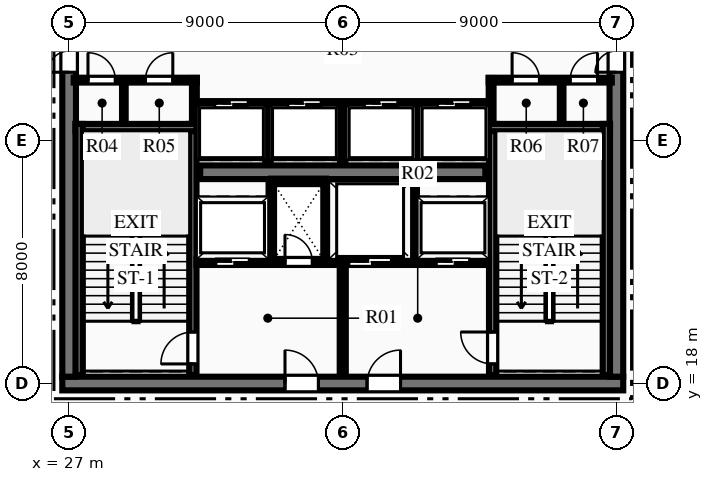
"""IFC4 building model, lengths in metres.
Left out: names, types, materials, properties, quantities, classifications, styles, units other than length and angle.
Written with IfcOpenShell. Run it as: python <this file> out.ifc"""

import sys

from ifc_helpers import new_model, si_unit, direction, frame, frame_2d, origin, place, context, subcontext, project, spatial, rectangle, extrude, element, fill, save


model = new_model("IFC4")
c1 = context("Model", 3, precision=1e-05, world=origin(), true_north=direction((0.0, 1.0)))
c2 = subcontext(c1, "Body", "Model", "MODEL_VIEW")
j1 = project(units=[si_unit("LENGTHUNIT", "METRE"), si_unit("PLANEANGLEUNIT", "RADIAN")], contexts=[c1])
p1 = place(None, origin())
s1 = spatial("IfcSite", under=j1, at=p1, CompositionType="ELEMENT")
p2 = place(p1, origin())
s2 = spatial("IfcBuilding", under=s1, at=p2, CompositionType="ELEMENT")
p3 = place(p2, frame((0.0, 0.0, 274.95)))
s3 = spatial("IfcBuildingStorey", under=s2, at=p3, CompositionType="ELEMENT", Elevation=274.95)
p4 = place(p3, frame((26.775, 18.0, 0.0), z_axis=(0.0, 0.0, 1.0), x_axis=(1.0, 0.0, 0.0)))
e1 = element("IfcWall", 1, at=p4, inside=s3, PredefinedType="SHEAR", context=c2, shape_type="SweptSolid", body=[
    extrude(rectangle(XDim=18.45, YDim=0.45, at=frame_2d((9.225, 0.0))), origin(), (0.0, 0.0, 1.0), 3.75),
])
p5 = place(p4, frame((7.325, 0.0, 0.0)))
e2 = element("IfcOpeningElement", 2, at=p5, cuts=e1, PredefinedType="OPENING", context=c2, shape_type="SweptSolid", body=[
    extrude(rectangle(XDim=1.1, YDim=2.15, at=frame_2d((0.55, 1.075))), frame((0.0, 0.235, 0.0), z_axis=(0.0, -1.0, 0.0), x_axis=(1.0, 0.0, 0.0)), (0.0, 0.0, 1.0), 0.47),
])
p6 = place(p4, frame((10.025, 0.0, 0.0)))
e3 = element("IfcOpeningElement", 3, at=p6, cuts=e1, PredefinedType="OPENING", context=c2, shape_type="SweptSolid", body=[
    extrude(rectangle(XDim=1.1, YDim=2.15, at=frame_2d((0.55, 1.075))), frame((0.0, 0.235, 0.0), z_axis=(0.0, -1.0, 0.0), x_axis=(1.0, 0.0, 0.0)), (0.0, 0.0, 1.0), 0.47),
])
p7 = place(p3, frame((27.0, 18.225, 0.0), z_axis=(0.0, 0.0, 1.0), x_axis=(0.0, 1.0, 0.0)))
e4 = element("IfcWall", 4, at=p7, inside=s3, PredefinedType="SHEAR", context=c2, shape_type="SweptSolid", body=[
    extrude(rectangle(XDim=15.55, YDim=0.45, at=frame_2d((7.775, 0.0))), origin(), (0.0, 0.0, 1.0), 3.75),
])
p8 = place(p7, frame((10.015, 0.0, 0.0)))
e5 = element("IfcOpeningElement", 5, at=p8, cuts=e4, PredefinedType="OPENING", context=c2, shape_type="SweptSolid", body=[
    extrude(rectangle(XDim=1.4, YDim=2.2, at=frame_2d((0.7, 1.1))), frame((0.0, 0.235, 0.0), z_axis=(0.0, -1.0, 0.0), x_axis=(1.0, 0.0, 0.0)), (0.0, 0.0, 1.0), 0.47),
])
p9 = place(p3, frame((45.0, 18.225, 0.0), z_axis=(0.0, 0.0, 1.0), x_axis=(0.0, 1.0, 0.0)))
e6 = element("IfcWall", 6, at=p9, inside=s3, PredefinedType="SHEAR", context=c2, shape_type="SweptSolid", body=[
    extrude(rectangle(XDim=15.55, YDim=0.45, at=frame_2d((7.775, 0.0))), origin(), (0.0, 0.0, 1.0), 3.75),
])
p10 = place(p9, frame((10.015, 0.0, 0.0)))
e7 = element("IfcOpeningElement", 7, at=p10, cuts=e6, PredefinedType="OPENING", context=c2, shape_type="SweptSolid", body=[
    extrude(rectangle(XDim=1.4, YDim=2.2, at=frame_2d((0.7, 1.1))), frame((0.0, 0.235, 0.0), z_axis=(0.0, -1.0, 0.0), x_axis=(1.0, 0.0, 0.0)), (0.0, 0.0, 1.0), 0.47),
])
p11 = place(p3, frame((31.31, 24.95, 0.0), z_axis=(0.0, 0.0, 1.0), x_axis=(1.0, 0.0, 0.0)))
e8 = element("IfcWall", 8, at=p11, inside=s3, PredefinedType="SHEAR", context=c2, shape_type="SweptSolid", body=[
    extrude(rectangle(XDim=9.38, YDim=0.45, at=frame_2d((4.69, 0.0))), origin(), (0.0, 0.0, 1.0), 3.75),
])
p12 = place(p3, frame((31.07, 18.28, 0.0), z_axis=(0.0, 0.0, 1.0), x_axis=(0.0, 1.0, 0.0)))
e9 = element("IfcWall", 9, at=p12, inside=s3, PredefinedType="SHEAR", context=c2, shape_type="SweptSolid", body=[
    extrude(rectangle(XDim=8.26, YDim=0.24, at=frame_2d((4.13, 0.0))), origin(), (0.0, 0.0, 1.0), 3.75),
])
p13 = place(p12, frame((0.365, 0.0, 0.0)))
e10 = element("IfcOpeningElement", 10, at=p13, cuts=e9, PredefinedType="OPENING", context=c2, shape_type="SweptSolid", body=[
    extrude(rectangle(XDim=1.05, YDim=2.15, at=frame_2d((0.525, 1.075))), frame((0.0, 0.13, 0.0), z_axis=(0.0, -1.0, 0.0), x_axis=(1.0, 0.0, 0.0)), (0.0, 0.0, 1.0), 0.26),
])
p14 = place(p3, frame((27.21, 26.42, 0.0), z_axis=(0.0, 0.0, 1.0), x_axis=(1.0, 0.0, 0.0)))
e11 = element("IfcWall", 11, at=p14, inside=s3, PredefinedType="SHEAR", context=c2, shape_type="SweptSolid", body=[
    extrude(rectangle(XDim=3.98, YDim=0.24, at=frame_2d((1.99, 0.0))), origin(), (0.0, 0.0, 1.0), 3.75),
])
p15 = place(p3, frame((27.33, 18.28, 0.0), z_axis=(0.0, 0.0, 1.0), x_axis=(0.0, 1.0, 0.0)))
e12 = element("IfcWall", 12, at=p15, inside=s3, PredefinedType="SHEAR", context=c2, shape_type="SweptSolid", body=[
    extrude(rectangle(XDim=8.26, YDim=0.24, at=frame_2d((4.13, 0.0))), origin(), (0.0, 0.0, 1.0), 3.75),
])
p16 = place(p3, frame((40.93, 18.28, 0.0), z_axis=(0.0, 0.0, 1.0), x_axis=(0.0, 1.0, 0.0)))
e13 = element("IfcWall", 13, at=p16, inside=s3, PredefinedType="SHEAR", context=c2, shape_type="SweptSolid", body=[
    extrude(rectangle(XDim=8.26, YDim=0.24, at=frame_2d((4.13, 0.0))), origin(), (0.0, 0.0, 1.0), 3.75),
])
p17 = place(p16, frame((0.365, 0.0, 0.0)))
e14 = element("IfcOpeningElement", 14, at=p17, cuts=e13, PredefinedType="OPENING", context=c2, shape_type="SweptSolid", body=[
    extrude(rectangle(XDim=1.05, YDim=2.15, at=frame_2d((0.525, 1.075))), frame((0.0, 0.13, 0.0), z_axis=(0.0, -1.0, 0.0), x_axis=(1.0, 0.0, 0.0)), (0.0, 0.0, 1.0), 0.26),
])
p18 = place(p3, frame((40.81, 26.42, 0.0), z_axis=(0.0, 0.0, 1.0), x_axis=(1.0, 0.0, 0.0)))
e15 = element("IfcWall", 15, at=p18, inside=s3, PredefinedType="SHEAR", context=c2, shape_type="SweptSolid", body=[
    extrude(rectangle(XDim=3.98, YDim=0.24, at=frame_2d((1.99, 0.0))), origin(), (0.0, 0.0, 1.0), 3.75),
])
p19 = place(p3, frame((44.67, 18.28, 0.0), z_axis=(0.0, 0.0, 1.0), x_axis=(0.0, 1.0, 0.0)))
e16 = element("IfcWall", 16, at=p19, inside=s3, PredefinedType="SHEAR", context=c2, shape_type="SweptSolid", body=[
    extrude(rectangle(XDim=8.26, YDim=0.24, at=frame_2d((4.13, 0.0))), origin(), (0.0, 0.0, 1.0), 3.75),
])
p20 = place(p3, frame((36.0, 18.28, 0.0), z_axis=(0.0, 0.0, 1.0), x_axis=(0.0, 1.0, 0.0)))
e17 = element("IfcWall", 17, at=p20, inside=s3, PredefinedType="PARTITIONING", context=c2, shape_type="SweptSolid", body=[
    extrude(rectangle(XDim=3.77, YDim=0.2, at=frame_2d((1.885, 0.0))), origin(), (0.0, 0.0, 1.0), 3.48),
])
p21 = place(p3, frame((31.19, 22.0, 0.0), z_axis=(0.0, 0.0, 1.0), x_axis=(1.0, 0.0, 0.0)))
e18 = element("IfcWall", 18, at=p21, inside=s3, PredefinedType="PARTITIONING", context=c2, shape_type="SweptSolid", body=[
    extrude(rectangle(XDim=4.69, YDim=0.2, at=frame_2d((2.345, 0.0))), origin(), (0.0, 0.0, 1.0), 3.48),
])
p22 = place(p21, frame((2.91, 0.0, 0.0)))
e19 = element("IfcOpeningElement", 19, at=p22, cuts=e18, PredefinedType="OPENING", context=c2, shape_type="SweptSolid", body=[
    extrude(rectangle(XDim=0.9, YDim=2.15, at=frame_2d((0.45, 1.075))), frame((0.0, 0.11, 0.0), z_axis=(0.0, -1.0, 0.0), x_axis=(1.0, 0.0, 0.0)), (0.0, 0.0, 1.0), 0.22),
])
p23 = place(p21, frame((0.635, 0.0, 0.0)))
e20 = element("IfcOpeningElement", 20, at=p23, cuts=e18, PredefinedType="OPENING", context=c2, shape_type="SweptSolid", body=[
    extrude(rectangle(XDim=1.1, YDim=2.15, at=frame_2d((0.55, 1.075))), frame((0.0, 0.11, 0.0), z_axis=(0.0, -1.0, 0.0), x_axis=(1.0, 0.0, 0.0)), (0.0, 0.0, 1.0), 0.22),
])
p24 = place(p3, frame((36.12, 22.0, 0.0), z_axis=(0.0, 0.0, 1.0), x_axis=(1.0, 0.0, 0.0)))
e21 = element("IfcWall", 21, at=p24, inside=s3, PredefinedType="PARTITIONING", context=c2, shape_type="SweptSolid", body=[
    extrude(rectangle(XDim=4.69, YDim=0.2, at=frame_2d((2.345, 0.0))), origin(), (0.0, 0.0, 1.0), 3.48),
])
p25 = place(p24, frame((2.955, 0.0, 0.0)))
e22 = element("IfcOpeningElement", 22, at=p25, cuts=e21, PredefinedType="OPENING", context=c2, shape_type="SweptSolid", body=[
    extrude(rectangle(XDim=1.1, YDim=2.15, at=frame_2d((0.55, 1.075))), frame((0.0, 0.11, 0.0), z_axis=(0.0, -1.0, 0.0), x_axis=(1.0, 0.0, 0.0)), (0.0, 0.0, 1.0), 0.22),
])
p26 = place(p24, frame((0.08, 0.0, 0.0)))
e23 = element("IfcOpeningElement", 23, at=p26, cuts=e21, PredefinedType="OPENING", context=c2, shape_type="SweptSolid", body=[
    extrude(rectangle(XDim=1.4, YDim=2.2, at=frame_2d((0.7, 1.1))), frame((0.0, 0.11, 0.0), z_axis=(0.0, -1.0, 0.0), x_axis=(1.0, 0.0, 0.0)), (0.0, 0.0, 1.0), 0.22),
])
for number, where, z_axis, x_axis in (
    (24, (33.65, 22.05, 0.0), (0.0, 0.0, 1.0), (0.0, 1.0, 0.0)),
    (25, (35.45, 22.05, 0.0), (0.0, 0.0, 1.0), (0.0, 1.0, 0.0)),
):
    element("IfcWall", number, at=place(p3, frame(where, z_axis=z_axis, x_axis=x_axis)), inside=s3, PredefinedType="PARTITIONING", context=c2, shape_type="SweptSolid", body=[
        extrude(rectangle(XDim=2.6, YDim=0.18, at=frame_2d((1.3, 0.0))), origin(), (0.0, 0.0, 1.0), 3.48),
    ])
p27 = place(p3, frame((33.65, 24.65, 0.0), z_axis=(0.0, 0.0, 1.0), x_axis=(1.0, 0.0, 0.0)))
e26 = element("IfcWall", 26, at=p27, inside=s3, PredefinedType="PARTITIONING", context=c2, shape_type="SweptSolid", body=[
    extrude(rectangle(XDim=1.8, YDim=0.18, at=frame_2d((0.9, 0.0))), origin(), (0.0, 0.0, 1.0), 3.48),
])
p28 = place(p3, frame((38.35, 22.05, 0.0), z_axis=(0.0, 0.0, 1.0), x_axis=(0.0, 1.0, 0.0)))
e27 = element("IfcWall", 27, at=p28, inside=s3, PredefinedType="PARTITIONING", context=c2, shape_type="SweptSolid", body=[
    extrude(rectangle(XDim=2.6, YDim=0.18, at=frame_2d((1.3, 0.0))), origin(), (0.0, 0.0, 1.0), 3.48),
])
p29 = place(p3, frame((27.15, 27.98, 0.0), z_axis=(0.0, 0.0, 1.0), x_axis=(1.0, 0.0, 0.0)))
e28 = element("IfcWall", 28, at=p29, inside=s3, PredefinedType="PARTITIONING", context=c2, shape_type="SweptSolid", body=[
    extrude(rectangle(XDim=4.05, YDim=0.16, at=frame_2d((2.025, 0.0))), origin(), (0.0, 0.0, 1.0), 3.48),
])
p30 = place(p29, frame((0.47, 0.0, 0.0)))
e29 = element("IfcOpeningElement", 29, at=p30, cuts=e28, PredefinedType="OPENING", context=c2, shape_type="SweptSolid", body=[
    extrude(rectangle(XDim=0.9, YDim=2.15, at=frame_2d((0.45, 1.075))), frame((0.0, 0.09, 0.0), z_axis=(0.0, -1.0, 0.0), x_axis=(1.0, 0.0, 0.0)), (0.0, 0.0, 1.0), 0.18),
])
p31 = place(p29, frame((2.36, 0.0, 0.0)))
e30 = element("IfcOpeningElement", 30, at=p31, cuts=e28, PredefinedType="OPENING", context=c2, shape_type="SweptSolid", body=[
    extrude(rectangle(XDim=0.9, YDim=2.15, at=frame_2d((0.45, 1.075))), frame((0.0, 0.09, 0.0), z_axis=(0.0, -1.0, 0.0), x_axis=(1.0, 0.0, 0.0)), (0.0, 0.0, 1.0), 0.18),
])
p32 = place(p3, frame((31.12, 26.54, 0.0), z_axis=(0.0, 0.0, 1.0), x_axis=(0.0, 1.0, 0.0)))
e31 = element("IfcWall", 31, at=p32, inside=s3, PredefinedType="PARTITIONING", context=c2, shape_type="SweptSolid", body=[
    extrude(rectangle(XDim=1.51, YDim=0.16, at=frame_2d((0.755, 0.0))), origin(), (0.0, 0.0, 1.0), 3.48),
])
p33 = place(p3, frame((40.8, 27.98, 0.0), z_axis=(0.0, 0.0, 1.0), x_axis=(1.0, 0.0, 0.0)))
e32 = element("IfcWall", 32, at=p33, inside=s3, PredefinedType="PARTITIONING", context=c2, shape_type="SweptSolid", body=[
    extrude(rectangle(XDim=4.05, YDim=0.16, at=frame_2d((2.025, 0.0))), origin(), (0.0, 0.0, 1.0), 3.48),
])
p34 = place(p33, frame((0.77, 0.0, 0.0)))
e33 = element("IfcOpeningElement", 33, at=p34, cuts=e32, PredefinedType="OPENING", context=c2, shape_type="SweptSolid", body=[
    extrude(rectangle(XDim=0.9, YDim=2.15, at=frame_2d((0.45, 1.075))), frame((0.0, 0.09, 0.0), z_axis=(0.0, -1.0, 0.0), x_axis=(1.0, 0.0, 0.0)), (0.0, 0.0, 1.0), 0.18),
])
p35 = place(p33, frame((2.68, 0.0, 0.0)))
e34 = element("IfcOpeningElement", 34, at=p35, cuts=e32, PredefinedType="OPENING", context=c2, shape_type="SweptSolid", body=[
    extrude(rectangle(XDim=0.9, YDim=2.15, at=frame_2d((0.45, 1.075))), frame((0.0, 0.09, 0.0), z_axis=(0.0, -1.0, 0.0), x_axis=(1.0, 0.0, 0.0)), (0.0, 0.0, 1.0), 0.18),
])
p36 = place(p3, frame((40.88, 26.54, 0.0), z_axis=(0.0, 0.0, 1.0), x_axis=(0.0, 1.0, 0.0)))
e35 = element("IfcWall", 35, at=p36, inside=s3, PredefinedType="PARTITIONING", context=c2, shape_type="SweptSolid", body=[
    extrude(rectangle(XDim=1.51, YDim=0.16, at=frame_2d((0.755, 0.0))), origin(), (0.0, 0.0, 1.0), 3.48),
])
for number, where, z_axis, x_axis in (
    (36, (28.8, 26.54, 0.0), (0.0, 0.0, 1.0), (0.0, 1.0, 0.0)),
    (37, (43.2, 26.54, 0.0), (0.0, 0.0, 1.0), (0.0, 1.0, 0.0)),
):
    element("IfcWall", number, at=place(p3, frame(where, z_axis=z_axis, x_axis=x_axis)), inside=s3, PredefinedType="PARTITIONING", context=c2, shape_type="SweptSolid", body=[
        extrude(rectangle(XDim=1.44, YDim=0.12, at=frame_2d((0.72, 0.0))), origin(), (0.0, 0.0, 1.0), 3.48),
    ])
p37 = place(p3, frame((31.2, 27.2, 0.0), z_axis=(0.0, 0.0, 1.0), x_axis=(1.0, 0.0, 0.0)))
e38 = element("IfcWall", 38, at=p37, inside=s3, PredefinedType="PARTITIONING", context=c2, shape_type="SweptSolid", body=[
    extrude(rectangle(XDim=9.6, YDim=0.18, at=frame_2d((4.8, 0.0))), origin(), (0.0, 0.0, 1.0), 3.48),
])
p38 = place(p37, frame((0.59, 0.0, 0.0)))
e39 = element("IfcOpeningElement", 39, at=p38, cuts=e38, PredefinedType="OPENING", context=c2, shape_type="SweptSolid", body=[
    extrude(rectangle(XDim=1.1, YDim=2.15, at=frame_2d((0.55, 1.075))), frame((0.0, 0.1, 0.0), z_axis=(0.0, -1.0, 0.0), x_axis=(1.0, 0.0, 0.0)), (0.0, 0.0, 1.0), 0.2),
])
p39 = place(p37, frame((2.99, 0.0, 0.0)))
e40 = element("IfcOpeningElement", 40, at=p39, cuts=e38, PredefinedType="OPENING", context=c2, shape_type="SweptSolid", body=[
    extrude(rectangle(XDim=1.1, YDim=2.15, at=frame_2d((0.55, 1.075))), frame((0.0, 0.1, 0.0), z_axis=(0.0, -1.0, 0.0), x_axis=(1.0, 0.0, 0.0)), (0.0, 0.0, 1.0), 0.2),
])
p40 = place(p37, frame((5.51, 0.0, 0.0)))
e41 = element("IfcOpeningElement", 41, at=p40, cuts=e38, PredefinedType="OPENING", context=c2, shape_type="SweptSolid", body=[
    extrude(rectangle(XDim=1.1, YDim=2.15, at=frame_2d((0.55, 1.075))), frame((0.0, 0.1, 0.0), z_axis=(0.0, -1.0, 0.0), x_axis=(1.0, 0.0, 0.0)), (0.0, 0.0, 1.0), 0.2),
])
p41 = place(p37, frame((7.91, 0.0, 0.0)))
e42 = element("IfcOpeningElement", 42, at=p41, cuts=e38, PredefinedType="OPENING", context=c2, shape_type="SweptSolid", body=[
    extrude(rectangle(XDim=1.1, YDim=2.15, at=frame_2d((0.55, 1.075))), frame((0.0, 0.1, 0.0), z_axis=(0.0, -1.0, 0.0), x_axis=(1.0, 0.0, 0.0)), (0.0, 0.0, 1.0), 0.2),
])
for number, where, z_axis, x_axis in (
    (43, (33.54, 25.3, 0.0), (0.0, 0.0, 1.0), (0.0, 1.0, 0.0)),
    (44, (36.0, 25.3, 0.0), (0.0, 0.0, 1.0), (0.0, 1.0, 0.0)),
    (45, (38.46, 25.3, 0.0), (0.0, 0.0, 1.0), (0.0, 1.0, 0.0)),
):
    element("IfcWall", number, at=place(p3, frame(where, z_axis=z_axis, x_axis=x_axis)), inside=s3, PredefinedType="PARTITIONING", context=c2, shape_type="SweptSolid", body=[
        extrude(rectangle(XDim=1.9, YDim=0.18, at=frame_2d((0.95, 0.0))), origin(), (0.0, 0.0, 1.0), 3.48),
    ])
p42 = place(p30, origin())
e46 = element("IfcDoor", 46, at=p42, inside=s3, OperationType="SINGLE_SWING_LEFT", PredefinedType="DOOR", context=c2, shape_type="SweptSolid", body=[
    extrude(rectangle(XDim=0.9, YDim=2.15, at=frame_2d((0.45, 1.075))), frame((0.0, 0.025, 0.0), z_axis=(0.0, -1.0, 0.0), x_axis=(1.0, 0.0, 0.0)), (0.0, 0.0, 1.0), 0.05),
])
fill(e29, e46)
p43 = place(p31, origin())
e47 = element("IfcDoor", 47, at=p43, inside=s3, OperationType="SINGLE_SWING_RIGHT", PredefinedType="DOOR", context=c2, shape_type="SweptSolid", body=[
    extrude(rectangle(XDim=0.9, YDim=2.15, at=frame_2d((0.45, 1.075))), frame((0.0, 0.025, 0.0), z_axis=(0.0, -1.0, 0.0), x_axis=(1.0, 0.0, 0.0)), (0.0, 0.0, 1.0), 0.05),
])
fill(e30, e47)
p44 = place(p34, origin())
e48 = element("IfcDoor", 48, at=p44, inside=s3, OperationType="SINGLE_SWING_LEFT", PredefinedType="DOOR", context=c2, shape_type="SweptSolid", body=[
    extrude(rectangle(XDim=0.9, YDim=2.15, at=frame_2d((0.45, 1.075))), frame((0.0, 0.025, 0.0), z_axis=(0.0, -1.0, 0.0), x_axis=(1.0, 0.0, 0.0)), (0.0, 0.0, 1.0), 0.05),
])
fill(e33, e48)
p45 = place(p35, origin())
e49 = element("IfcDoor", 49, at=p45, inside=s3, OperationType="SINGLE_SWING_RIGHT", PredefinedType="DOOR", context=c2, shape_type="SweptSolid", body=[
    extrude(rectangle(XDim=0.9, YDim=2.15, at=frame_2d((0.45, 1.075))), frame((0.0, 0.025, 0.0), z_axis=(0.0, -1.0, 0.0), x_axis=(1.0, 0.0, 0.0)), (0.0, 0.0, 1.0), 0.05),
])
fill(e34, e49)
p46 = place(p13, origin())
e50 = element("IfcDoor", 50, at=p46, inside=s3, OperationType="SINGLE_SWING_LEFT", PredefinedType="DOOR", context=c2, shape_type="SweptSolid", body=[
    extrude(rectangle(XDim=1.05, YDim=2.15, at=frame_2d((0.525, 1.075))), frame((0.0, 0.025, 0.0), z_axis=(0.0, -1.0, 0.0), x_axis=(1.0, 0.0, 0.0)), (0.0, 0.0, 1.0), 0.05),
])
fill(e10, e50)
p47 = place(p17, origin())
e51 = element("IfcDoor", 51, at=p47, inside=s3, OperationType="SINGLE_SWING_RIGHT", PredefinedType="DOOR", context=c2, shape_type="SweptSolid", body=[
    extrude(rectangle(XDim=1.05, YDim=2.15, at=frame_2d((0.525, 1.075))), frame((0.0, 0.025, 0.0), z_axis=(0.0, -1.0, 0.0), x_axis=(1.0, 0.0, 0.0)), (0.0, 0.0, 1.0), 0.05),
])
fill(e14, e51)
p48 = place(p5, origin())
e52 = element("IfcDoor", 52, at=p48, inside=s3, OperationType="SINGLE_SWING_LEFT", PredefinedType="DOOR", context=c2, shape_type="SweptSolid", body=[
    extrude(rectangle(XDim=1.1, YDim=2.15, at=frame_2d((0.55, 1.075))), frame((0.0, 0.025, 0.0), z_axis=(0.0, -1.0, 0.0), x_axis=(1.0, 0.0, 0.0)), (0.0, 0.0, 1.0), 0.05),
])
fill(e2, e52)
p49 = place(p6, origin())
e53 = element("IfcDoor", 53, at=p49, inside=s3, OperationType="SINGLE_SWING_RIGHT", PredefinedType="DOOR", context=c2, shape_type="SweptSolid", body=[
    extrude(rectangle(XDim=1.1, YDim=2.15, at=frame_2d((0.55, 1.075))), frame((0.0, 0.025, 0.0), z_axis=(0.0, -1.0, 0.0), x_axis=(1.0, 0.0, 0.0)), (0.0, 0.0, 1.0), 0.05),
])
fill(e3, e53)
p50 = place(p22, origin())
e54 = element("IfcDoor", 54, at=p50, inside=s3, OperationType="SINGLE_SWING_LEFT", PredefinedType="DOOR", context=c2, shape_type="SweptSolid", body=[
    extrude(rectangle(XDim=0.9, YDim=2.15, at=frame_2d((0.45, 1.075))), frame((0.0, 0.025, 0.0), z_axis=(0.0, -1.0, 0.0), x_axis=(1.0, 0.0, 0.0)), (0.0, 0.0, 1.0), 0.05),
])
fill(e19, e54)
p51 = place(p8, origin())
e55 = element("IfcDoor", 55, at=p51, inside=s3, OperationType="DOUBLE_DOOR_SINGLE_SWING", PredefinedType="DOOR", context=c2, shape_type="SweptSolid", body=[
    extrude(rectangle(XDim=1.4, YDim=2.2, at=frame_2d((0.7, 1.1))), frame((0.0, 0.025, 0.0), z_axis=(0.0, -1.0, 0.0), x_axis=(1.0, 0.0, 0.0)), (0.0, 0.0, 1.0), 0.05),
])
fill(e5, e55)
p52 = place(p10, origin())
e56 = element("IfcDoor", 56, at=p52, inside=s3, OperationType="DOUBLE_DOOR_SINGLE_SWING", PredefinedType="DOOR", context=c2, shape_type="SweptSolid", body=[
    extrude(rectangle(XDim=1.4, YDim=2.2, at=frame_2d((0.7, 1.1))), frame((0.0, 0.025, 0.0), z_axis=(0.0, -1.0, 0.0), x_axis=(1.0, 0.0, 0.0)), (0.0, 0.0, 1.0), 0.05),
])
fill(e7, e56)
p53 = place(p38, origin())
e57 = element("IfcDoor", 57, at=p53, inside=s3, OperationType="SLIDING_TO_LEFT", PredefinedType="DOOR", context=c2, shape_type="SweptSolid", body=[
    extrude(rectangle(XDim=1.1, YDim=2.15, at=frame_2d((0.55, 1.075))), frame((0.0, 0.025, 0.0), z_axis=(0.0, -1.0, 0.0), x_axis=(1.0, 0.0, 0.0)), (0.0, 0.0, 1.0), 0.05),
])
fill(e39, e57)
p54 = place(p39, origin())
e58 = element("IfcDoor", 58, at=p54, inside=s3, OperationType="SLIDING_TO_LEFT", PredefinedType="DOOR", context=c2, shape_type="SweptSolid", body=[
    extrude(rectangle(XDim=1.1, YDim=2.15, at=frame_2d((0.55, 1.075))), frame((0.0, 0.025, 0.0), z_axis=(0.0, -1.0, 0.0), x_axis=(1.0, 0.0, 0.0)), (0.0, 0.0, 1.0), 0.05),
])
fill(e40, e58)
p55 = place(p40, origin())
e59 = element("IfcDoor", 59, at=p55, inside=s3, OperationType="SLIDING_TO_LEFT", PredefinedType="DOOR", context=c2, shape_type="SweptSolid", body=[
    extrude(rectangle(XDim=1.1, YDim=2.15, at=frame_2d((0.55, 1.075))), frame((0.0, 0.025, 0.0), z_axis=(0.0, -1.0, 0.0), x_axis=(1.0, 0.0, 0.0)), (0.0, 0.0, 1.0), 0.05),
])
fill(e41, e59)
p56 = place(p41, origin())
e60 = element("IfcDoor", 60, at=p56, inside=s3, OperationType="SLIDING_TO_LEFT", PredefinedType="DOOR", context=c2, shape_type="SweptSolid", body=[
    extrude(rectangle(XDim=1.1, YDim=2.15, at=frame_2d((0.55, 1.075))), frame((0.0, 0.025, 0.0), z_axis=(0.0, -1.0, 0.0), x_axis=(1.0, 0.0, 0.0)), (0.0, 0.0, 1.0), 0.05),
])
fill(e42, e60)
p57 = place(p23, origin())
e61 = element("IfcDoor", 61, at=p57, inside=s3, OperationType="SLIDING_TO_LEFT", PredefinedType="DOOR", context=c2, shape_type="SweptSolid", body=[
    extrude(rectangle(XDim=1.1, YDim=2.15, at=frame_2d((0.55, 1.075))), frame((0.0, 0.025, 0.0), z_axis=(0.0, -1.0, 0.0), x_axis=(1.0, 0.0, 0.0)), (0.0, 0.0, 1.0), 0.05),
])
fill(e20, e61)
p58 = place(p25, origin())
e62 = element("IfcDoor", 62, at=p58, inside=s3, OperationType="SLIDING_TO_LEFT", PredefinedType="DOOR", context=c2, shape_type="SweptSolid", body=[
    extrude(rectangle(XDim=1.1, YDim=2.15, at=frame_2d((0.55, 1.075))), frame((0.0, 0.025, 0.0), z_axis=(0.0, -1.0, 0.0), x_axis=(1.0, 0.0, 0.0)), (0.0, 0.0, 1.0), 0.05),
])
fill(e22, e62)
p59 = place(p26, origin())
e63 = element("IfcDoor", 63, at=p59, inside=s3, OperationType="SLIDING_TO_LEFT", PredefinedType="DOOR", context=c2, shape_type="SweptSolid", body=[
    extrude(rectangle(XDim=1.4, YDim=2.2, at=frame_2d((0.7, 1.1))), frame((0.0, 0.025, 0.0), z_axis=(0.0, -1.0, 0.0), x_axis=(1.0, 0.0, 0.0)), (0.0, 0.0, 1.0), 0.05),
])
fill(e23, e63)
save(model, sys.argv[1])
